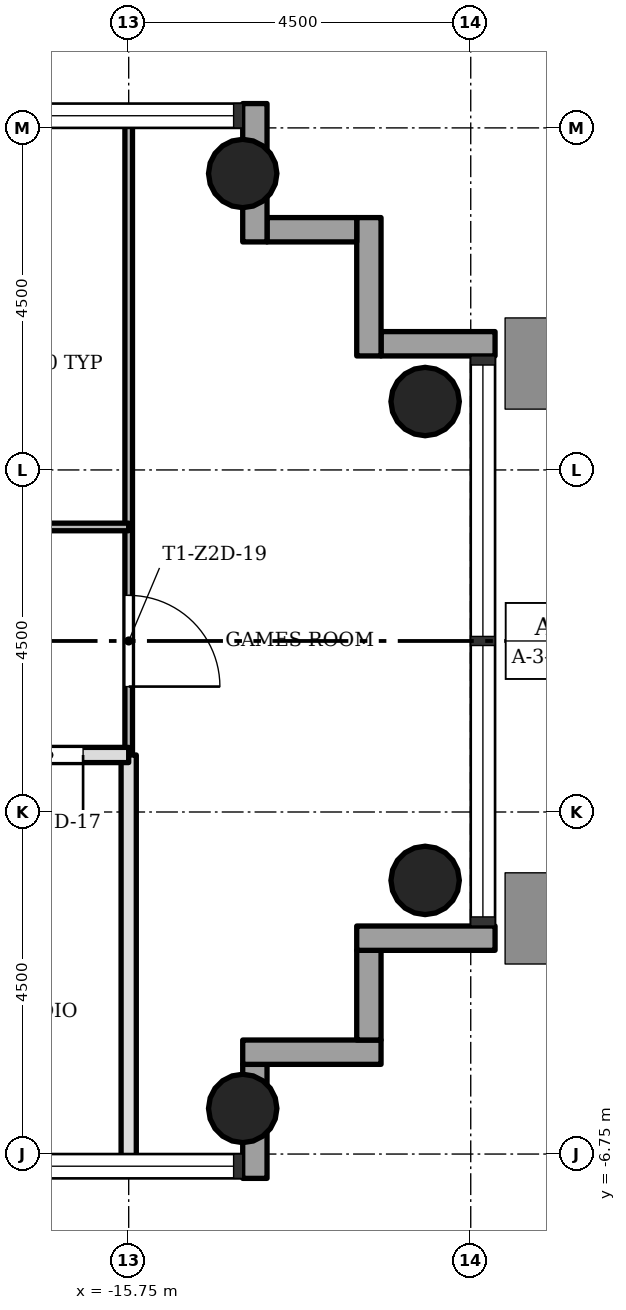
"""IFC4 building model, lengths in metres.
Left out: names, types, materials, properties, quantities, classifications, styles, units other than length and angle.
Written with IfcOpenShell. Run it as: python <this file> out.ifc"""

import sys

from ifc_helpers import new_model, si_unit, direction, frame, frame_2d, origin, origin_2d, place, context, subcontext, project, spatial, rectangle, hollow_circle, extrude, element, fill, save


model = new_model("IFC4")
c1 = context("Model", 3, precision=1e-05, world=origin(), true_north=direction((0.0, 1.0)))
c2 = subcontext(c1, "Body", "Model", "MODEL_VIEW")
j1 = project(units=[si_unit("LENGTHUNIT", "METRE"), si_unit("PLANEANGLEUNIT", "RADIAN")], contexts=[c1])
p1 = place(None, origin())
s1 = spatial("IfcSite", under=j1, at=p1, CompositionType="ELEMENT")
p2 = place(p1, origin())
s2 = spatial("IfcBuilding", under=s1, at=p2, CompositionType="ELEMENT")
p3 = place(p2, frame((0.0, 0.0, 120.8)))
s3 = spatial("IfcBuildingStorey", under=s2, at=p3, CompositionType="ELEMENT", Elevation=120.8)
for number, where, z_axis, x_axis in (
    (1, (-14.25, -6.15, 0.0), (0.0, 0.0, 1.0), (1.0, 0.0, 0.0)),
    (2, (-14.25, 6.15, 0.0), (0.0, 0.0, 1.0), (1.0, 0.0, 0.0)),
    (3, (-11.85, -3.15, 0.0), (0.0, 0.0, 1.0), (1.0, 0.0, 0.0)),
    (4, (-11.85, 3.15, 0.0), (0.0, 0.0, 1.0), (1.0, 0.0, 0.0)),
):
    element("IfcColumn", number, at=place(p3, frame(where, z_axis=z_axis, x_axis=x_axis)), inside=s3, PredefinedType="COLUMN", context=c2, shape_type="SweptSolid", body=[
        extrude(hollow_circle(Radius=0.45, WallThickness=0.032, at=origin_2d()), origin(), (0.0, 0.0, 1.0), 3.4),
    ])
p4 = place(p3, frame((-14.09, -7.07, -0.3), z_axis=(0.0, 0.0, 1.0), x_axis=(0.0, 1.0, 0.0)))
e5 = element("IfcWall", 5, at=p4, inside=s3, PredefinedType="STANDARD", context=c2, shape_type="SweptSolid", body=[
    extrude(rectangle(XDim=1.5, YDim=0.32, at=frame_2d((0.75, 0.0))), origin(), (0.0, 0.0, 1.0), 3.4),
])
p5 = place(p3, frame((-14.25, -5.41, -0.3), z_axis=(0.0, 0.0, 1.0), x_axis=(1.0, 0.0, 0.0)))
e6 = element("IfcWall", 6, at=p5, inside=s3, PredefinedType="STANDARD", context=c2, shape_type="SweptSolid", body=[
    extrude(rectangle(XDim=1.82, YDim=0.32, at=frame_2d((0.91, 0.0))), origin(), (0.0, 0.0, 1.0), 3.4),
])
p6 = place(p3, frame((-12.59, -5.25, -0.3), z_axis=(0.0, 0.0, 1.0), x_axis=(0.0, 1.0, 0.0)))
e7 = element("IfcWall", 7, at=p6, inside=s3, PredefinedType="STANDARD", context=c2, shape_type="SweptSolid", body=[
    extrude(rectangle(XDim=1.18, YDim=0.32, at=frame_2d((0.59, 0.0))), origin(), (0.0, 0.0, 1.0), 3.4),
])
p7 = place(p3, frame((-12.75, -3.91, -0.3), z_axis=(0.0, 0.0, 1.0), x_axis=(1.0, 0.0, 0.0)))
e8 = element("IfcWall", 8, at=p7, inside=s3, PredefinedType="STANDARD", context=c2, shape_type="SweptSolid", body=[
    extrude(rectangle(XDim=1.82, YDim=0.32, at=frame_2d((0.91, 0.0))), origin(), (0.0, 0.0, 1.0), 3.4),
])
p8 = place(p3, frame((-10.93, 3.91, -0.3), z_axis=(0.0, 0.0, 1.0), x_axis=(-1.0, 0.0, 0.0)))
e9 = element("IfcWall", 9, at=p8, inside=s3, PredefinedType="STANDARD", context=c2, shape_type="SweptSolid", body=[
    extrude(rectangle(XDim=1.5, YDim=0.32, at=frame_2d((0.75, 0.0))), origin(), (0.0, 0.0, 1.0), 3.4),
])
p9 = place(p3, frame((-12.59, 3.75, -0.3), z_axis=(0.0, 0.0, 1.0), x_axis=(0.0, 1.0, 0.0)))
e10 = element("IfcWall", 10, at=p9, inside=s3, PredefinedType="STANDARD", context=c2, shape_type="SweptSolid", body=[
    extrude(rectangle(XDim=1.82, YDim=0.32, at=frame_2d((0.91, 0.0))), origin(), (0.0, 0.0, 1.0), 3.4),
])
p10 = place(p3, frame((-12.75, 5.41, -0.3), z_axis=(0.0, 0.0, 1.0), x_axis=(-1.0, 0.0, 0.0)))
e11 = element("IfcWall", 11, at=p10, inside=s3, PredefinedType="STANDARD", context=c2, shape_type="SweptSolid", body=[
    extrude(rectangle(XDim=1.18, YDim=0.32, at=frame_2d((0.59, 0.0))), origin(), (0.0, 0.0, 1.0), 3.4),
])
p11 = place(p3, frame((-14.09, 5.25, -0.3), z_axis=(0.0, 0.0, 1.0), x_axis=(0.0, 1.0, 0.0)))
e12 = element("IfcWall", 12, at=p11, inside=s3, PredefinedType="STANDARD", context=c2, shape_type="SweptSolid", body=[
    extrude(rectangle(XDim=1.82, YDim=0.32, at=frame_2d((0.91, 0.0))), origin(), (0.0, 0.0, 1.0), 3.4),
])
p12 = place(p3, frame((-15.75, -1.5, 0.0), z_axis=(0.0, 0.0, 1.0), x_axis=(0.0, 1.0, 0.0)))
e13 = element("IfcWall", 13, at=p12, inside=s3, PredefinedType="PARTITIONING", context=c2, shape_type="SweptSolid", body=[
    extrude(rectangle(XDim=8.35, YDim=0.1, at=frame_2d((4.175, 0.0))), origin(), (0.0, 0.0, 1.0), 3.0),
])
p13 = place(p12, frame((0.9, 0.0, 0.0)))
e14 = element("IfcOpeningElement", 14, at=p13, cuts=e13, PredefinedType="OPENING", context=c2, shape_type="SweptSolid", body=[
    extrude(rectangle(XDim=1.2, YDim=2.1, at=frame_2d((0.6, 1.05))), frame((0.0, 0.06, 0.0), z_axis=(0.0, -1.0, 0.0), x_axis=(1.0, 0.0, 0.0)), (0.0, 0.0, 1.0), 0.12),
])
p14 = place(p3, frame((-15.75, -6.85, 0.0), z_axis=(0.0, 0.0, 1.0), x_axis=(0.0, 1.0, 0.0)))
e15 = element("IfcWall", 15, at=p14, inside=s3, PredefinedType="SOLIDWALL", context=c2, shape_type="SweptSolid", body=[
    extrude(rectangle(XDim=5.35, YDim=0.2, at=frame_2d((2.675, 0.0))), origin(), (0.0, 0.0, 1.0), 3.0),
])
p15 = place(p3, frame((-20.25, -1.5, 0.0), z_axis=(0.0, 0.0, 1.0), x_axis=(1.0, 0.0, 0.0)))
e16 = element("IfcWall", 16, at=p15, inside=s3, PredefinedType="SOLIDWALL", context=c2, shape_type="SweptSolid", body=[
    extrude(rectangle(XDim=4.5, YDim=0.2, at=frame_2d((2.25, 0.0))), origin(), (0.0, 0.0, 1.0), 3.0),
])
p16 = place(p15, frame((3.0, 0.0, 0.0)))
e17 = element("IfcOpeningElement", 17, at=p16, cuts=e16, PredefinedType="OPENING", context=c2, shape_type="SweptSolid", body=[
    extrude(rectangle(XDim=0.9, YDim=2.1, at=frame_2d((0.45, 1.05))), frame((0.0, 0.11, 0.0), z_axis=(0.0, -1.0, 0.0), x_axis=(1.0, 0.0, 0.0)), (0.0, 0.0, 1.0), 0.22),
])
p17 = place(p3, frame((-20.25, 1.5, 0.0), z_axis=(0.0, 0.0, 1.0), x_axis=(1.0, 0.0, 0.0)))
e18 = element("IfcWall", 18, at=p17, inside=s3, PredefinedType="PARTITIONING", context=c2, shape_type="SweptSolid", body=[
    extrude(rectangle(XDim=4.5, YDim=0.1, at=frame_2d((2.25, 0.0))), origin(), (0.0, 0.0, 1.0), 3.0),
])
p18 = place(p17, frame((1.8, 0.0, 0.0)))
e19 = element("IfcOpeningElement", 19, at=p18, cuts=e18, PredefinedType="OPENING", context=c2, shape_type="SweptSolid", body=[
    extrude(rectangle(XDim=0.9, YDim=2.1, at=frame_2d((0.45, 1.05))), frame((0.0, 0.06, 0.0), z_axis=(0.0, -1.0, 0.0), x_axis=(1.0, 0.0, 0.0)), (0.0, 0.0, 1.0), 0.12),
])
p19 = place(p16, origin())
e20 = element("IfcDoor", 20, at=p19, inside=s3, OperationType="SINGLE_SWING_RIGHT", PredefinedType="DOOR", context=c2, shape_type="SweptSolid", body=[
    extrude(rectangle(XDim=0.9, YDim=2.1, at=frame_2d((0.45, 1.05))), frame((0.0, 0.025, 0.0), z_axis=(0.0, -1.0, 0.0), x_axis=(1.0, 0.0, 0.0)), (0.0, 0.0, 1.0), 0.05),
])
fill(e17, e20)
p20 = place(p13, origin())
e21 = element("IfcDoor", 21, at=p20, inside=s3, OperationType="SINGLE_SWING_LEFT", PredefinedType="DOOR", context=c2, shape_type="SweptSolid", body=[
    extrude(rectangle(XDim=1.2, YDim=2.1, at=frame_2d((0.6, 1.05))), frame((0.0, 0.025, 0.0), z_axis=(0.0, -1.0, 0.0), x_axis=(1.0, 0.0, 0.0)), (0.0, 0.0, 1.0), 0.05),
])
fill(e14, e21)
save(model, sys.argv[1])
